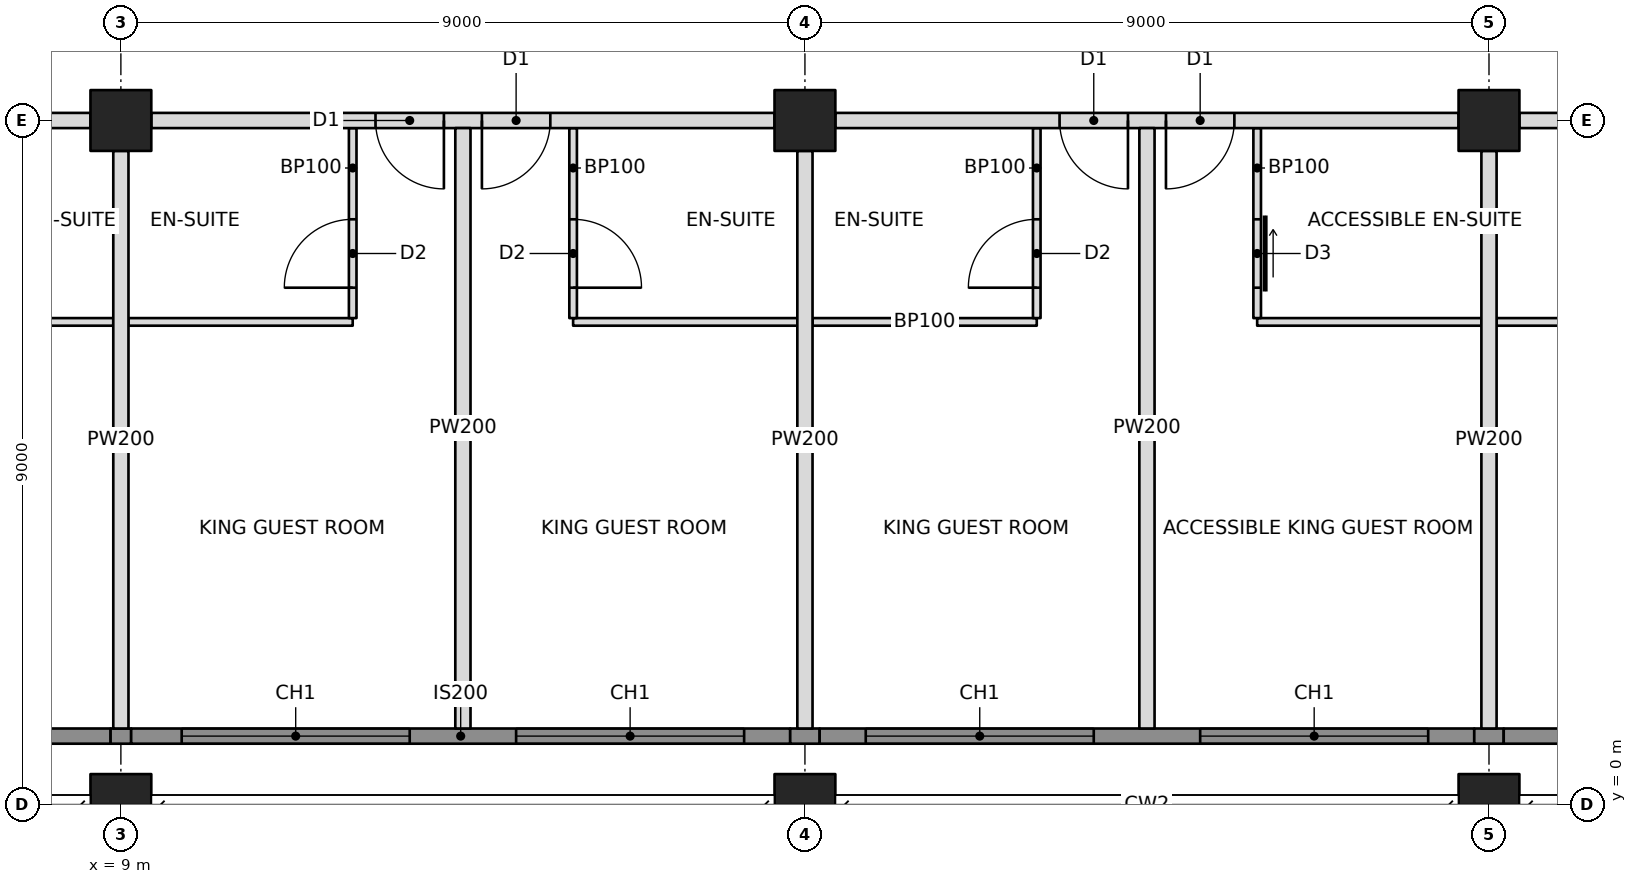
"""IFC4 building model, lengths in metres.
Left out: names, types, materials, properties, quantities, classifications, styles, units other than length and angle.
Written with IfcOpenShell. Run it as: python <this file> out.ifc"""

import sys

from ifc_helpers import new_model, si_unit, direction, frame, frame_2d, origin, origin_2d, place, context, subcontext, project, spatial, rectangle, hollow_rectangle, extrude, element, fill, save


model = new_model("IFC4")
c1 = context("Model", 3, precision=1e-05, world=origin(), true_north=direction((0.0, 1.0)))
c2 = subcontext(c1, "Body", "Model", "MODEL_VIEW")
j1 = project(units=[si_unit("LENGTHUNIT", "METRE"), si_unit("PLANEANGLEUNIT", "RADIAN")], contexts=[c1])
p1 = place(None, origin())
s1 = spatial("IfcSite", under=j1, at=p1, CompositionType="ELEMENT")
p2 = place(p1, origin())
s2 = spatial("IfcBuilding", under=s1, at=p2, CompositionType="ELEMENT")
p3 = place(p2, frame((0.0, 0.0, 259.0)))
s3 = spatial("IfcBuildingStorey", under=s2, at=p3, CompositionType="ELEMENT", Elevation=259.0)
for number, where, z_axis, x_axis in (
    (1, (9.0, 0.0, 0.0), (0.0, 0.0, 1.0), (1.0, 0.0, 0.0)),
    (2, (9.0, 9.0, 0.0), (0.0, 0.0, 1.0), (1.0, 0.0, 0.0)),
    (3, (18.0, 0.0, 0.0), (0.0, 0.0, 1.0), (1.0, 0.0, 0.0)),
    (4, (18.0, 9.0, 0.0), (0.0, 0.0, 1.0), (1.0, 0.0, 0.0)),
    (5, (27.0, 0.0, 0.0), (0.0, 0.0, 1.0), (1.0, 0.0, 0.0)),
    (6, (27.0, 9.0, 0.0), (0.0, 0.0, 1.0), (1.0, 0.0, 0.0)),
):
    element("IfcColumn", number, at=place(p3, frame(where, z_axis=z_axis, x_axis=x_axis)), inside=s3, PredefinedType="COLUMN", context=c2, shape_type="SweptSolid", body=[
        extrude(hollow_rectangle(XDim=0.8, YDim=0.8, WallThickness=0.032, at=origin_2d()), origin(), (0.0, 0.0, 1.0), 3.6),
    ])
p4 = place(p3, frame((3.0, 0.9, 0.0), z_axis=(0.0, 0.0, 1.0), x_axis=(1.0, 0.0, 0.0)))
e7 = element("IfcWall", 7, at=p4, inside=s3, PredefinedType="SOLIDWALL", context=c2, shape_type="SweptSolid", body=[
    extrude(rectangle(XDim=5.865, YDim=0.2, at=frame_2d((2.932, 0.0))), origin(), (0.0, 0.0, 1.0), 3.4),
])
p5 = place(p4, frame((1.45, 0.0, 0.6)))
e8 = element("IfcOpeningElement", 8, at=p5, cuts=e7, PredefinedType="OPENING", context=c2, shape_type="SweptSolid", body=[
    extrude(rectangle(XDim=3.0, YDim=2.2, at=frame_2d((1.5, 1.1))), frame((0.0, 0.11, 0.0), z_axis=(0.0, -1.0, 0.0), x_axis=(1.0, 0.0, 0.0)), (0.0, 0.0, 1.0), 0.22),
])
p6 = place(p3, frame((1.0, 9.0, 0.0), z_axis=(0.0, 0.0, 1.0), x_axis=(1.0, 0.0, 0.0)))
e9 = element("IfcWall", 9, at=p6, inside=s3, PredefinedType="PARTITIONING", context=c2, shape_type="SweptSolid", body=[
    extrude(rectangle(XDim=7.6, YDim=0.2, at=frame_2d((3.8, 0.0))), origin(), (0.0, 0.0, 1.0), 2.638),
])
p7 = place(p6, frame((0.25, 0.0, 0.0)))
e10 = element("IfcOpeningElement", 10, at=p7, cuts=e9, PredefinedType="OPENING", context=c2, shape_type="SweptSolid", body=[
    extrude(rectangle(XDim=0.9, YDim=2.1, at=frame_2d((0.45, 1.05))), frame((0.0, 0.11, 0.0), z_axis=(0.0, -1.0, 0.0), x_axis=(1.0, 0.0, 0.0)), (0.0, 0.0, 1.0), 0.22),
])
p8 = place(p3, frame((9.4, 9.0, 0.0), z_axis=(0.0, 0.0, 1.0), x_axis=(1.0, 0.0, 0.0)))
e11 = element("IfcWall", 11, at=p8, inside=s3, PredefinedType="PARTITIONING", context=c2, shape_type="SweptSolid", body=[
    extrude(rectangle(XDim=8.2, YDim=0.2, at=frame_2d((4.1, 0.0))), origin(), (0.0, 0.0, 1.0), 2.605),
])
p9 = place(p8, frame((2.95, 0.0, 0.0)))
e12 = element("IfcOpeningElement", 12, at=p9, cuts=e11, PredefinedType="OPENING", context=c2, shape_type="SweptSolid", body=[
    extrude(rectangle(XDim=0.9, YDim=2.1, at=frame_2d((0.45, 1.05))), frame((0.0, 0.11, 0.0), z_axis=(0.0, -1.0, 0.0), x_axis=(1.0, 0.0, 0.0)), (0.0, 0.0, 1.0), 0.22),
])
p10 = place(p8, frame((4.35, 0.0, 0.0)))
e13 = element("IfcOpeningElement", 13, at=p10, cuts=e11, PredefinedType="OPENING", context=c2, shape_type="SweptSolid", body=[
    extrude(rectangle(XDim=0.9, YDim=2.1, at=frame_2d((0.45, 1.05))), frame((0.0, 0.11, 0.0), z_axis=(0.0, -1.0, 0.0), x_axis=(1.0, 0.0, 0.0)), (0.0, 0.0, 1.0), 0.22),
])
p11 = place(p3, frame((18.4, 9.0, 0.0), z_axis=(0.0, 0.0, 1.0), x_axis=(1.0, 0.0, 0.0)))
e14 = element("IfcWall", 14, at=p11, inside=s3, PredefinedType="PARTITIONING", context=c2, shape_type="SweptSolid", body=[
    extrude(rectangle(XDim=8.2, YDim=0.2, at=frame_2d((4.1, 0.0))), origin(), (0.0, 0.0, 1.0), 2.605),
])
p12 = place(p11, frame((2.95, 0.0, 0.0)))
e15 = element("IfcOpeningElement", 15, at=p12, cuts=e14, PredefinedType="OPENING", context=c2, shape_type="SweptSolid", body=[
    extrude(rectangle(XDim=0.9, YDim=2.1, at=frame_2d((0.45, 1.05))), frame((0.0, 0.11, 0.0), z_axis=(0.0, -1.0, 0.0), x_axis=(1.0, 0.0, 0.0)), (0.0, 0.0, 1.0), 0.22),
])
p13 = place(p11, frame((4.35, 0.0, 0.0)))
e16 = element("IfcOpeningElement", 16, at=p13, cuts=e14, PredefinedType="OPENING", context=c2, shape_type="SweptSolid", body=[
    extrude(rectangle(XDim=0.9, YDim=2.1, at=frame_2d((0.45, 1.05))), frame((0.0, 0.11, 0.0), z_axis=(0.0, -1.0, 0.0), x_axis=(1.0, 0.0, 0.0)), (0.0, 0.0, 1.0), 0.22),
])
p14 = place(p3, frame((27.4, 9.0, 0.0), z_axis=(0.0, 0.0, 1.0), x_axis=(1.0, 0.0, 0.0)))
e17 = element("IfcWall", 17, at=p14, inside=s3, PredefinedType="PARTITIONING", context=c2, shape_type="SweptSolid", body=[
    extrude(rectangle(XDim=8.378, YDim=0.2, at=frame_2d((4.189, 0.0))), origin(), (0.0, 0.0, 1.0), 2.605),
])
p15 = place(p14, frame((7.25, 0.0, 0.0)))
e18 = element("IfcOpeningElement", 18, at=p15, cuts=e17, PredefinedType="OPENING", context=c2, shape_type="SweptSolid", body=[
    extrude(rectangle(XDim=0.9, YDim=2.1, at=frame_2d((0.45, 1.05))), frame((0.0, 0.11, 0.0), z_axis=(0.0, -1.0, 0.0), x_axis=(1.0, 0.0, 0.0)), (0.0, 0.0, 1.0), 0.22),
])
p16 = place(p3, frame((9.0, 8.6, 0.0), z_axis=(0.0, 0.0, 1.0), x_axis=(0.0, -1.0, 0.0)))
e19 = element("IfcWall", 19, at=p16, inside=s3, PredefinedType="PARTITIONING", context=c2, shape_type="SweptSolid", body=[
    extrude(rectangle(XDim=7.6, YDim=0.2, at=frame_2d((3.8, 0.0))), origin(), (0.0, 0.0, 1.0), 2.638),
])
p17 = place(p3, frame((13.5, 8.9, 0.0), z_axis=(0.0, 0.0, 1.0), x_axis=(0.0, -1.0, 0.0)))
e20 = element("IfcWall", 20, at=p17, inside=s3, PredefinedType="PARTITIONING", context=c2, shape_type="SweptSolid", body=[
    extrude(rectangle(XDim=7.9, YDim=0.2, at=frame_2d((3.95, 0.0))), origin(), (0.0, 0.0, 1.0), 2.604),
])
p18 = place(p3, frame((18.0, 8.6, 0.0), z_axis=(0.0, 0.0, 1.0), x_axis=(0.0, -1.0, 0.0)))
e21 = element("IfcWall", 21, at=p18, inside=s3, PredefinedType="PARTITIONING", context=c2, shape_type="SweptSolid", body=[
    extrude(rectangle(XDim=7.6, YDim=0.2, at=frame_2d((3.8, 0.0))), origin(), (0.0, 0.0, 1.0), 2.605),
])
p19 = place(p3, frame((22.5, 8.9, 0.0), z_axis=(0.0, 0.0, 1.0), x_axis=(0.0, -1.0, 0.0)))
e22 = element("IfcWall", 22, at=p19, inside=s3, PredefinedType="PARTITIONING", context=c2, shape_type="SweptSolid", body=[
    extrude(rectangle(XDim=7.9, YDim=0.2, at=frame_2d((3.95, 0.0))), origin(), (0.0, 0.0, 1.0), 2.604),
])
p20 = place(p3, frame((27.0, 8.6, 0.0), z_axis=(0.0, 0.0, 1.0), x_axis=(0.0, -1.0, 0.0)))
e23 = element("IfcWall", 23, at=p20, inside=s3, PredefinedType="PARTITIONING", context=c2, shape_type="SweptSolid", body=[
    extrude(rectangle(XDim=7.6, YDim=0.2, at=frame_2d((3.8, 0.0))), origin(), (0.0, 0.0, 1.0), 2.605),
])
p21 = place(p3, frame((5.45, 6.35, 0.0), z_axis=(0.0, 0.0, 1.0), x_axis=(1.0, 0.0, 0.0)))
e24 = element("IfcWall", 24, at=p21, inside=s3, PredefinedType="PARTITIONING", context=c2, shape_type="SweptSolid", body=[
    extrude(rectangle(XDim=3.45, YDim=0.1, at=frame_2d((1.725, 0.0))), origin(), (0.0, 0.0, 1.0), 2.638),
])
p22 = place(p3, frame((9.1, 6.35, 0.0), z_axis=(0.0, 0.0, 1.0), x_axis=(1.0, 0.0, 0.0)))
e25 = element("IfcWall", 25, at=p22, inside=s3, PredefinedType="PARTITIONING", context=c2, shape_type="SweptSolid", body=[
    extrude(rectangle(XDim=2.95, YDim=0.1, at=frame_2d((1.475, 0.0))), origin(), (0.0, 0.0, 1.0), 2.638),
])
p23 = place(p3, frame((12.05, 8.9, 0.0), z_axis=(0.0, 0.0, 1.0), x_axis=(0.0, -1.0, 0.0)))
e26 = element("IfcWall", 26, at=p23, inside=s3, PredefinedType="PARTITIONING", context=c2, shape_type="SweptSolid", body=[
    extrude(rectangle(XDim=2.5, YDim=0.1, at=frame_2d((1.25, 0.0))), origin(), (0.0, 0.0, 1.0), 2.604),
])
p24 = place(p23, frame((1.2, 0.0, 0.0)))
e27 = element("IfcOpeningElement", 27, at=p24, cuts=e26, PredefinedType="OPENING", context=c2, shape_type="SweptSolid", body=[
    extrude(rectangle(XDim=0.9, YDim=2.1, at=frame_2d((0.45, 1.05))), frame((0.0, 0.06, 0.0), z_axis=(0.0, -1.0, 0.0), x_axis=(1.0, 0.0, 0.0)), (0.0, 0.0, 1.0), 0.12),
])
p25 = place(p3, frame((14.95, 6.35, 0.0), z_axis=(0.0, 0.0, 1.0), x_axis=(1.0, 0.0, 0.0)))
e28 = element("IfcWall", 28, at=p25, inside=s3, PredefinedType="PARTITIONING", context=c2, shape_type="SweptSolid", body=[
    extrude(rectangle(XDim=2.95, YDim=0.1, at=frame_2d((1.475, 0.0))), origin(), (0.0, 0.0, 1.0), 2.604),
])
p26 = place(p3, frame((14.95, 8.9, 0.0), z_axis=(0.0, 0.0, 1.0), x_axis=(0.0, -1.0, 0.0)))
e29 = element("IfcWall", 29, at=p26, inside=s3, PredefinedType="PARTITIONING", context=c2, shape_type="SweptSolid", body=[
    extrude(rectangle(XDim=2.5, YDim=0.1, at=frame_2d((1.25, 0.0))), origin(), (0.0, 0.0, 1.0), 2.604),
])
p27 = place(p26, frame((1.2, 0.0, 0.0)))
e30 = element("IfcOpeningElement", 30, at=p27, cuts=e29, PredefinedType="OPENING", context=c2, shape_type="SweptSolid", body=[
    extrude(rectangle(XDim=0.9, YDim=2.1, at=frame_2d((0.45, 1.05))), frame((0.0, 0.06, 0.0), z_axis=(0.0, -1.0, 0.0), x_axis=(1.0, 0.0, 0.0)), (0.0, 0.0, 1.0), 0.12),
])
p28 = place(p3, frame((18.1, 6.35, 0.0), z_axis=(0.0, 0.0, 1.0), x_axis=(1.0, 0.0, 0.0)))
e31 = element("IfcWall", 31, at=p28, inside=s3, PredefinedType="PARTITIONING", context=c2, shape_type="SweptSolid", body=[
    extrude(rectangle(XDim=2.95, YDim=0.1, at=frame_2d((1.475, 0.0))), origin(), (0.0, 0.0, 1.0), 2.604),
])
p29 = place(p3, frame((21.05, 8.9, 0.0), z_axis=(0.0, 0.0, 1.0), x_axis=(0.0, -1.0, 0.0)))
e32 = element("IfcWall", 32, at=p29, inside=s3, PredefinedType="PARTITIONING", context=c2, shape_type="SweptSolid", body=[
    extrude(rectangle(XDim=2.5, YDim=0.1, at=frame_2d((1.25, 0.0))), origin(), (0.0, 0.0, 1.0), 2.604),
])
p30 = place(p29, frame((1.2, 0.0, 0.0)))
e33 = element("IfcOpeningElement", 33, at=p30, cuts=e32, PredefinedType="OPENING", context=c2, shape_type="SweptSolid", body=[
    extrude(rectangle(XDim=0.9, YDim=2.1, at=frame_2d((0.45, 1.05))), frame((0.0, 0.06, 0.0), z_axis=(0.0, -1.0, 0.0), x_axis=(1.0, 0.0, 0.0)), (0.0, 0.0, 1.0), 0.12),
])
p31 = place(p3, frame((23.95, 6.35, 0.0), z_axis=(0.0, 0.0, 1.0), x_axis=(1.0, 0.0, 0.0)))
e34 = element("IfcWall", 34, at=p31, inside=s3, PredefinedType="PARTITIONING", context=c2, shape_type="SweptSolid", body=[
    extrude(rectangle(XDim=2.95, YDim=0.1, at=frame_2d((1.475, 0.0))), origin(), (0.0, 0.0, 1.0), 2.604),
])
p32 = place(p3, frame((23.95, 8.9, 0.0), z_axis=(0.0, 0.0, 1.0), x_axis=(0.0, -1.0, 0.0)))
e35 = element("IfcWall", 35, at=p32, inside=s3, PredefinedType="PARTITIONING", context=c2, shape_type="SweptSolid", body=[
    extrude(rectangle(XDim=2.5, YDim=0.1, at=frame_2d((1.25, 0.0))), origin(), (0.0, 0.0, 1.0), 2.604),
])
p33 = place(p32, frame((1.2, 0.0, 0.0)))
e36 = element("IfcOpeningElement", 36, at=p33, cuts=e35, PredefinedType="OPENING", context=c2, shape_type="SweptSolid", body=[
    extrude(rectangle(XDim=0.9, YDim=2.1, at=frame_2d((0.45, 1.05))), frame((0.0, 0.06, 0.0), z_axis=(0.0, -1.0, 0.0), x_axis=(1.0, 0.0, 0.0)), (0.0, 0.0, 1.0), 0.12),
])
p34 = place(p3, frame((27.1, 6.35, 0.0), z_axis=(0.0, 0.0, 1.0), x_axis=(1.0, 0.0, 0.0)))
e37 = element("IfcWall", 37, at=p34, inside=s3, PredefinedType="PARTITIONING", context=c2, shape_type="SweptSolid", body=[
    extrude(rectangle(XDim=3.45, YDim=0.1, at=frame_2d((1.725, 0.0))), origin(), (0.0, 0.0, 1.0), 2.604),
])
p35 = place(p3, frame((8.865, 0.9, 0.0), z_axis=(0.0, 0.0, 1.0), x_axis=(1.0, 0.0, 0.0)))
e38 = element("IfcWall", 38, at=p35, inside=s3, PredefinedType="SOLIDWALL", context=c2, shape_type="SweptSolid", body=[
    extrude(rectangle(XDim=0.271, YDim=0.2, at=frame_2d((0.135, 0.0))), origin(), (0.0, 0.0, 1.0), 2.638),
])
p36 = place(p3, frame((9.135, 0.9, 0.0), z_axis=(0.0, 0.0, 1.0), x_axis=(1.0, 0.0, 0.0)))
e39 = element("IfcWall", 39, at=p36, inside=s3, PredefinedType="SOLIDWALL", context=c2, shape_type="SweptSolid", body=[
    extrude(rectangle(XDim=8.671, YDim=0.2, at=frame_2d((4.335, 0.0))), origin(), (0.0, 0.0, 1.0), 3.4),
])
p37 = place(p36, frame((0.665, 0.0, 0.6)))
e40 = element("IfcOpeningElement", 40, at=p37, cuts=e39, PredefinedType="OPENING", context=c2, shape_type="SweptSolid", body=[
    extrude(rectangle(XDim=3.0, YDim=2.2, at=frame_2d((1.5, 1.1))), frame((0.0, 0.11, 0.0), z_axis=(0.0, -1.0, 0.0), x_axis=(1.0, 0.0, 0.0)), (0.0, 0.0, 1.0), 0.22),
])
p38 = place(p36, frame((5.065, 0.0, 0.6)))
e41 = element("IfcOpeningElement", 41, at=p38, cuts=e39, PredefinedType="OPENING", context=c2, shape_type="SweptSolid", body=[
    extrude(rectangle(XDim=3.0, YDim=2.2, at=frame_2d((1.5, 1.1))), frame((0.0, 0.11, 0.0), z_axis=(0.0, -1.0, 0.0), x_axis=(1.0, 0.0, 0.0)), (0.0, 0.0, 1.0), 0.22),
])
p39 = place(p3, frame((17.806, 0.9, 0.0), z_axis=(0.0, 0.0, 1.0), x_axis=(1.0, 0.0, 0.0)))
e42 = element("IfcWall", 42, at=p39, inside=s3, PredefinedType="SOLIDWALL", context=c2, shape_type="SweptSolid", body=[
    extrude(rectangle(XDim=0.388, YDim=0.2, at=frame_2d((0.194, 0.0))), origin(), (0.0, 0.0, 1.0), 2.604),
])
p40 = place(p3, frame((18.194, 0.9, 0.0), z_axis=(0.0, 0.0, 1.0), x_axis=(1.0, 0.0, 0.0)))
e43 = element("IfcWall", 43, at=p40, inside=s3, PredefinedType="SOLIDWALL", context=c2, shape_type="SweptSolid", body=[
    extrude(rectangle(XDim=8.612, YDim=0.2, at=frame_2d((4.306, 0.0))), origin(), (0.0, 0.0, 1.0), 3.4),
])
p41 = place(p40, frame((0.606, 0.0, 0.6)))
e44 = element("IfcOpeningElement", 44, at=p41, cuts=e43, PredefinedType="OPENING", context=c2, shape_type="SweptSolid", body=[
    extrude(rectangle(XDim=3.0, YDim=2.2, at=frame_2d((1.5, 1.1))), frame((0.0, 0.11, 0.0), z_axis=(0.0, -1.0, 0.0), x_axis=(1.0, 0.0, 0.0)), (0.0, 0.0, 1.0), 0.22),
])
p42 = place(p40, frame((5.006, 0.0, 0.6)))
e45 = element("IfcOpeningElement", 45, at=p42, cuts=e43, PredefinedType="OPENING", context=c2, shape_type="SweptSolid", body=[
    extrude(rectangle(XDim=3.0, YDim=2.2, at=frame_2d((1.5, 1.1))), frame((0.0, 0.11, 0.0), z_axis=(0.0, -1.0, 0.0), x_axis=(1.0, 0.0, 0.0)), (0.0, 0.0, 1.0), 0.22),
])
p43 = place(p3, frame((26.806, 0.9, 0.0), z_axis=(0.0, 0.0, 1.0), x_axis=(1.0, 0.0, 0.0)))
e46 = element("IfcWall", 46, at=p43, inside=s3, PredefinedType="SOLIDWALL", context=c2, shape_type="SweptSolid", body=[
    extrude(rectangle(XDim=0.388, YDim=0.2, at=frame_2d((0.194, 0.0))), origin(), (0.0, 0.0, 1.0), 2.604),
])
p44 = place(p3, frame((27.194, 0.9, 0.0), z_axis=(0.0, 0.0, 1.0), x_axis=(1.0, 0.0, 0.0)))
e47 = element("IfcWall", 47, at=p44, inside=s3, PredefinedType="SOLIDWALL", context=c2, shape_type="SweptSolid", body=[
    extrude(rectangle(XDim=5.806, YDim=0.2, at=frame_2d((2.903, 0.0))), origin(), (0.0, 0.0, 1.0), 3.4),
])
p45 = place(p44, frame((1.356, 0.0, 0.6)))
e48 = element("IfcOpeningElement", 48, at=p45, cuts=e47, PredefinedType="OPENING", context=c2, shape_type="SweptSolid", body=[
    extrude(rectangle(XDim=3.0, YDim=2.2, at=frame_2d((1.5, 1.1))), frame((0.0, 0.11, 0.0), z_axis=(0.0, -1.0, 0.0), x_axis=(1.0, 0.0, 0.0)), (0.0, 0.0, 1.0), 0.22),
])
p46 = place(p37, origin())
e49 = element("IfcWindow", 49, at=p46, inside=s3, PartitioningType="TRIPLE_PANEL_VERTICAL", PredefinedType="WINDOW", context=c2, shape_type="SweptSolid", body=[
    extrude(rectangle(XDim=3.0, YDim=2.2, at=frame_2d((1.5, 1.1))), frame((0.0, 0.03, 0.0), z_axis=(0.0, -1.0, 0.0), x_axis=(1.0, 0.0, 0.0)), (0.0, 0.0, 1.0), 0.06),
])
fill(e40, e49)
p47 = place(p38, origin())
e50 = element("IfcWindow", 50, at=p47, inside=s3, PartitioningType="TRIPLE_PANEL_VERTICAL", PredefinedType="WINDOW", context=c2, shape_type="SweptSolid", body=[
    extrude(rectangle(XDim=3.0, YDim=2.2, at=frame_2d((1.5, 1.1))), frame((0.0, 0.03, 0.0), z_axis=(0.0, -1.0, 0.0), x_axis=(1.0, 0.0, 0.0)), (0.0, 0.0, 1.0), 0.06),
])
fill(e41, e50)
p48 = place(p41, origin())
e51 = element("IfcWindow", 51, at=p48, inside=s3, PartitioningType="TRIPLE_PANEL_VERTICAL", PredefinedType="WINDOW", context=c2, shape_type="SweptSolid", body=[
    extrude(rectangle(XDim=3.0, YDim=2.2, at=frame_2d((1.5, 1.1))), frame((0.0, 0.03, 0.0), z_axis=(0.0, -1.0, 0.0), x_axis=(1.0, 0.0, 0.0)), (0.0, 0.0, 1.0), 0.06),
])
fill(e44, e51)
p49 = place(p42, origin())
e52 = element("IfcWindow", 52, at=p49, inside=s3, PartitioningType="TRIPLE_PANEL_VERTICAL", PredefinedType="WINDOW", context=c2, shape_type="SweptSolid", body=[
    extrude(rectangle(XDim=3.0, YDim=2.2, at=frame_2d((1.5, 1.1))), frame((0.0, 0.03, 0.0), z_axis=(0.0, -1.0, 0.0), x_axis=(1.0, 0.0, 0.0)), (0.0, 0.0, 1.0), 0.06),
])
fill(e45, e52)
p50 = place(p24, frame((0.9, 0.0, 0.0), z_axis=(0.0, 0.0, 1.0), x_axis=(-1.0, 0.0, 0.0)))
e53 = element("IfcDoor", 53, at=p50, inside=s3, OperationType="SINGLE_SWING_LEFT", PredefinedType="DOOR", context=c2, shape_type="SweptSolid", body=[
    extrude(rectangle(XDim=0.9, YDim=2.1, at=frame_2d((0.45, 1.05))), frame((0.0, 0.025, 0.0), z_axis=(0.0, -1.0, 0.0), x_axis=(1.0, 0.0, 0.0)), (0.0, 0.0, 1.0), 0.05),
])
fill(e27, e53)
p51 = place(p9, frame((0.9, 0.0, 0.0), z_axis=(0.0, 0.0, 1.0), x_axis=(-1.0, 0.0, 0.0)))
e54 = element("IfcDoor", 54, at=p51, inside=s3, OperationType="SINGLE_SWING_LEFT", PredefinedType="DOOR", context=c2, shape_type="SweptSolid", body=[
    extrude(rectangle(XDim=0.9, YDim=2.1, at=frame_2d((0.45, 1.05))), frame((0.0, 0.025, 0.0), z_axis=(0.0, -1.0, 0.0), x_axis=(1.0, 0.0, 0.0)), (0.0, 0.0, 1.0), 0.05),
])
fill(e12, e54)
p52 = place(p27, origin())
e55 = element("IfcDoor", 55, at=p52, inside=s3, OperationType="SINGLE_SWING_RIGHT", PredefinedType="DOOR", context=c2, shape_type="SweptSolid", body=[
    extrude(rectangle(XDim=0.9, YDim=2.1, at=frame_2d((0.45, 1.05))), frame((0.0, 0.025, 0.0), z_axis=(0.0, -1.0, 0.0), x_axis=(1.0, 0.0, 0.0)), (0.0, 0.0, 1.0), 0.05),
])
fill(e30, e55)
p53 = place(p10, frame((0.9, 0.0, 0.0), z_axis=(0.0, 0.0, 1.0), x_axis=(-1.0, 0.0, 0.0)))
e56 = element("IfcDoor", 56, at=p53, inside=s3, OperationType="SINGLE_SWING_RIGHT", PredefinedType="DOOR", context=c2, shape_type="SweptSolid", body=[
    extrude(rectangle(XDim=0.9, YDim=2.1, at=frame_2d((0.45, 1.05))), frame((0.0, 0.025, 0.0), z_axis=(0.0, -1.0, 0.0), x_axis=(1.0, 0.0, 0.0)), (0.0, 0.0, 1.0), 0.05),
])
fill(e13, e56)
p54 = place(p30, frame((0.9, 0.0, 0.0), z_axis=(0.0, 0.0, 1.0), x_axis=(-1.0, 0.0, 0.0)))
e57 = element("IfcDoor", 57, at=p54, inside=s3, OperationType="SINGLE_SWING_LEFT", PredefinedType="DOOR", context=c2, shape_type="SweptSolid", body=[
    extrude(rectangle(XDim=0.9, YDim=2.1, at=frame_2d((0.45, 1.05))), frame((0.0, 0.025, 0.0), z_axis=(0.0, -1.0, 0.0), x_axis=(1.0, 0.0, 0.0)), (0.0, 0.0, 1.0), 0.05),
])
fill(e33, e57)
p55 = place(p12, frame((0.9, 0.0, 0.0), z_axis=(0.0, 0.0, 1.0), x_axis=(-1.0, 0.0, 0.0)))
e58 = element("IfcDoor", 58, at=p55, inside=s3, OperationType="SINGLE_SWING_LEFT", PredefinedType="DOOR", context=c2, shape_type="SweptSolid", body=[
    extrude(rectangle(XDim=0.9, YDim=2.1, at=frame_2d((0.45, 1.05))), frame((0.0, 0.025, 0.0), z_axis=(0.0, -1.0, 0.0), x_axis=(1.0, 0.0, 0.0)), (0.0, 0.0, 1.0), 0.05),
])
fill(e15, e58)
p56 = place(p33, origin())
e59 = element("IfcDoor", 59, at=p56, inside=s3, OperationType="SLIDING_TO_LEFT", PredefinedType="DOOR", context=c2, shape_type="SweptSolid", body=[
    extrude(rectangle(XDim=0.9, YDim=2.1, at=frame_2d((0.45, 1.05))), frame((0.0, 0.025, 0.0), z_axis=(0.0, -1.0, 0.0), x_axis=(1.0, 0.0, 0.0)), (0.0, 0.0, 1.0), 0.05),
])
fill(e36, e59)
p57 = place(p13, frame((0.9, 0.0, 0.0), z_axis=(0.0, 0.0, 1.0), x_axis=(-1.0, 0.0, 0.0)))
e60 = element("IfcDoor", 60, at=p57, inside=s3, OperationType="SINGLE_SWING_RIGHT", PredefinedType="DOOR", context=c2, shape_type="SweptSolid", body=[
    extrude(rectangle(XDim=0.9, YDim=2.1, at=frame_2d((0.45, 1.05))), frame((0.0, 0.025, 0.0), z_axis=(0.0, -1.0, 0.0), x_axis=(1.0, 0.0, 0.0)), (0.0, 0.0, 1.0), 0.05),
])
fill(e16, e60)
save(model, sys.argv[1])
